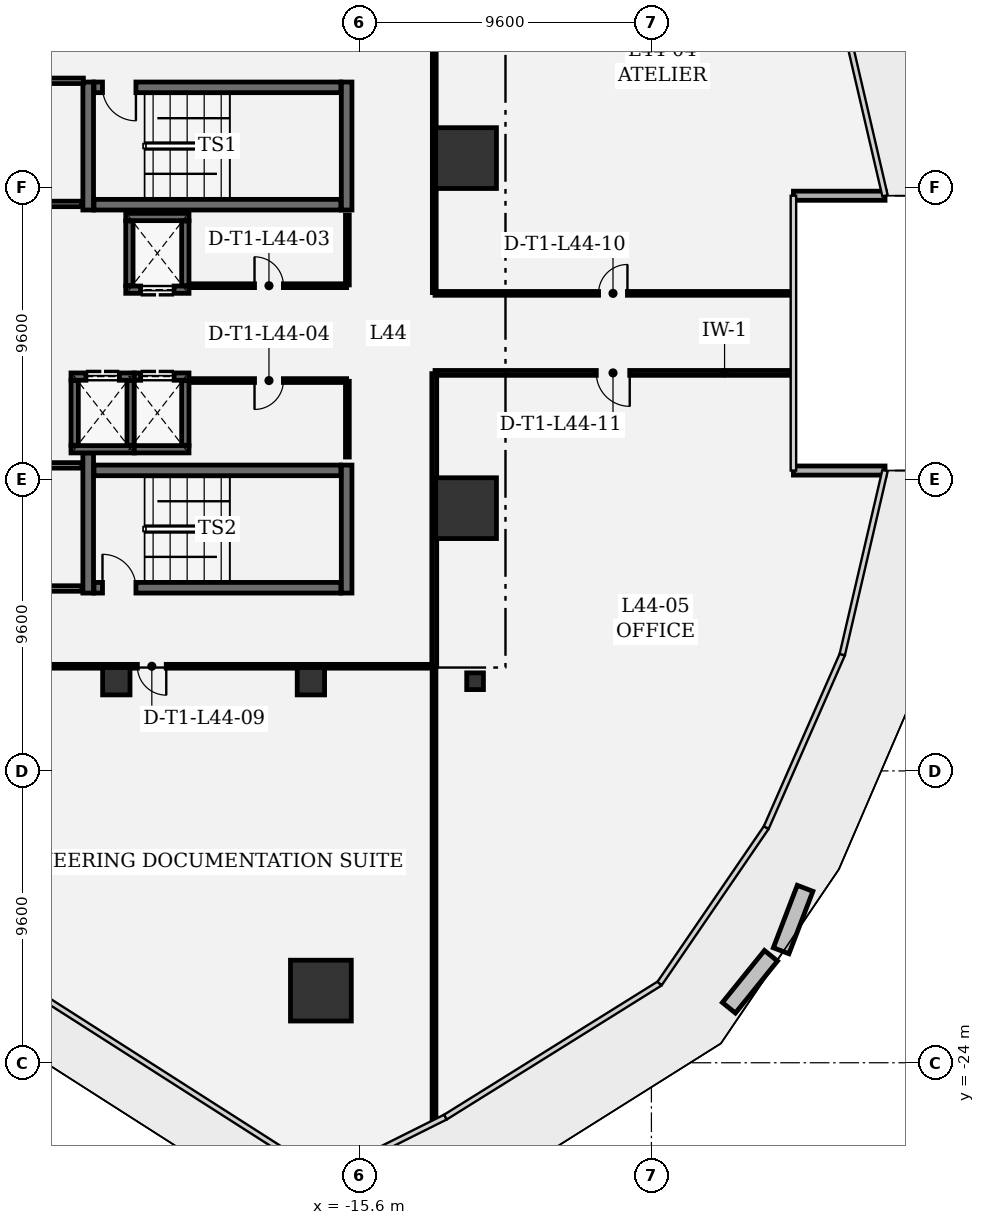
"""IFC4 building model, lengths in metres.
Left out: names, types, materials, properties, quantities, classifications, styles, units other than length and angle.
Written with IfcOpenShell. Run it as: python <this file> out.ifc"""

import sys

from ifc_helpers import new_model, si_unit, direction, frame, frame_2d, origin, origin_2d, place, context, subcontext, project, spatial, rectangle, extrude, element, fill, save


model = new_model("IFC4")
c1 = context("Model", 3, precision=1e-05, world=origin(), true_north=direction((0.0, 1.0)))
c2 = subcontext(c1, "Body", "Model", "MODEL_VIEW")
j1 = project(units=[si_unit("LENGTHUNIT", "METRE"), si_unit("PLANEANGLEUNIT", "RADIAN")], contexts=[c1])
p1 = place(None, origin())
s1 = spatial("IfcSite", under=j1, at=p1, CompositionType="ELEMENT")
p2 = place(p1, origin())
s2 = spatial("IfcBuilding", under=s1, at=p2, CompositionType="ELEMENT")
p3 = place(p2, frame((0.0, 0.0, 192.9)))
s3 = spatial("IfcBuildingStorey", under=s2, at=p3, CompositionType="ELEMENT", Elevation=192.9)
for number, where, z_axis, x_axis in (
    (1, (-16.872, -21.627, 0.0), (0.0, 0.0, 1.0), (1.0, 0.0, 0.0)),
    (2, (-12.097, -5.758, 0.0), (0.0, 0.0, 1.0), (1.0, 0.0, 0.0)),
    (3, (-12.097, 5.758, 0.0), (0.0, 0.0, 1.0), (1.0, 0.0, 0.0)),
):
    element("IfcColumn", number, at=place(p3, frame(where, z_axis=z_axis, x_axis=x_axis)), inside=s3, PredefinedType="COLUMN", context=c2, shape_type="SweptSolid", body=[
        extrude(rectangle(XDim=2.0, YDim=2.0, at=origin_2d()), origin(), (0.0, 0.0, 1.0), 4.05),
    ])
for number, where, z_axis, x_axis in (
    (4, (-17.2, -11.45, 0.0), (0.0, 0.0, 1.0), (1.0, 0.0, 0.0)),
    (5, (-23.6, -11.45, 0.0), (0.0, 0.0, 1.0), (1.0, 0.0, 0.0)),
):
    element("IfcColumn", number, at=place(p3, frame(where, z_axis=z_axis, x_axis=x_axis)), inside=s3, PredefinedType="COLUMN", context=c2, shape_type="SweptSolid", body=[
        extrude(rectangle(XDim=0.9, YDim=0.9, at=origin_2d()), origin(), (0.0, 0.0, 1.0), 4.05),
    ])
p4 = place(p3, frame((-11.8, -11.45, 0.0), z_axis=(0.0, 0.0, 1.0), x_axis=(1.0, 0.0, 0.0)))
e6 = element("IfcColumn", 6, at=p4, inside=s3, PredefinedType="COLUMN", context=c2, shape_type="SweptSolid", body=[
    extrude(rectangle(XDim=0.55, YDim=0.55, at=origin_2d()), origin(), (0.0, 0.0, 1.0), 4.05),
])
for number, where, z_axis, x_axis in (
    (7, (1.684, -4.52, 0.0), (0.0, 0.0, 1.0), (-1.0, 0.0, 0.0)),
    (8, (-1.329, 4.52, 0.0), (0.0, 0.0, 1.0), (1.0, 0.0, 0.0)),
):
    element("IfcWall", number, at=place(p3, frame(where, z_axis=z_axis, x_axis=x_axis)), inside=s3, PredefinedType="SOLIDWALL", context=c2, shape_type="SweptSolid", body=[
        extrude(rectangle(XDim=3.013, YDim=0.3, at=frame_2d((1.507, 0.0))), origin(), (0.0, 0.0, 1.0), 3.78),
    ])
for number, where, z_axis, x_axis in (
    (9, (-24.525, 8.26, 0.0), (0.0, 0.0, 1.0), (0.0, -1.0, 0.0)),
    (10, (-16.025, 4.05, 0.0), (0.0, 0.0, 1.0), (0.0, 1.0, 0.0)),
):
    element("IfcWall", number, at=place(p3, frame(where, z_axis=z_axis, x_axis=x_axis)), inside=s3, PredefinedType="SHEAR", context=c2, shape_type="SweptSolid", body=[
        extrude(rectangle(XDim=4.21, YDim=0.35, at=frame_2d((2.105, 0.0))), origin(), (0.0, 0.0, 1.0), 3.78),
    ])
p5 = place(p3, frame((-24.335, 4.225, 0.0), z_axis=(0.0, 0.0, 1.0), x_axis=(1.0, 0.0, 0.0)))
e11 = element("IfcWall", 11, at=p5, inside=s3, PredefinedType="SHEAR", context=c2, shape_type="SweptSolid", body=[
    extrude(rectangle(XDim=8.12, YDim=0.35, at=frame_2d((4.06, 0.0))), origin(), (0.0, 0.0, 1.0), 3.78),
])
p6 = place(p3, frame((-16.215, 8.085, 0.0), z_axis=(0.0, 0.0, 1.0), x_axis=(-1.0, 0.0, 0.0)))
e12 = element("IfcWall", 12, at=p6, inside=s3, PredefinedType="SHEAR", context=c2, shape_type="SweptSolid", body=[
    extrude(rectangle(XDim=8.12, YDim=0.35, at=frame_2d((4.06, 0.0))), origin(), (0.0, 0.0, 1.0), 3.78),
])
p7 = place(p6, frame((6.74, 0.0, 0.0)))
e13 = element("IfcOpeningElement", 13, at=p7, cuts=e12, PredefinedType="OPENING", context=c2, shape_type="SweptSolid", body=[
    extrude(rectangle(XDim=1.1, YDim=2.2, at=frame_2d((0.55, 1.1))), frame((0.0, 0.185, 0.0), z_axis=(0.0, -1.0, 0.0), x_axis=(1.0, 0.0, 0.0)), (0.0, 0.0, 1.0), 0.37),
])
p8 = place(p3, frame((-24.525, -3.94, 0.0), z_axis=(0.0, 0.0, 1.0), x_axis=(0.0, -1.0, 0.0)))
e14 = element("IfcWall", 14, at=p8, inside=s3, PredefinedType="SHEAR", context=c2, shape_type="SweptSolid", body=[
    extrude(rectangle(XDim=4.61, YDim=0.35, at=frame_2d((2.305, 0.0))), origin(), (0.0, 0.0, 1.0), 3.78),
])
p9 = place(p3, frame((-16.025, -8.55, 0.0), z_axis=(0.0, 0.0, 1.0), x_axis=(0.0, 1.0, 0.0)))
e15 = element("IfcWall", 15, at=p9, inside=s3, PredefinedType="SHEAR", context=c2, shape_type="SweptSolid", body=[
    extrude(rectangle(XDim=4.21, YDim=0.35, at=frame_2d((2.105, 0.0))), origin(), (0.0, 0.0, 1.0), 3.78),
])
p10 = place(p3, frame((-24.335, -8.375, 0.0), z_axis=(0.0, 0.0, 1.0), x_axis=(1.0, 0.0, 0.0)))
e16 = element("IfcWall", 16, at=p10, inside=s3, PredefinedType="SHEAR", context=c2, shape_type="SweptSolid", body=[
    extrude(rectangle(XDim=8.12, YDim=0.35, at=frame_2d((4.06, 0.0))), origin(), (0.0, 0.0, 1.0), 3.78),
])
p11 = place(p10, frame((0.28, 0.0, 0.0)))
e17 = element("IfcOpeningElement", 17, at=p11, cuts=e16, PredefinedType="OPENING", context=c2, shape_type="SweptSolid", body=[
    extrude(rectangle(XDim=1.1, YDim=2.2, at=frame_2d((0.55, 1.1))), frame((0.0, 0.185, 0.0), z_axis=(0.0, -1.0, 0.0), x_axis=(1.0, 0.0, 0.0)), (0.0, 0.0, 1.0), 0.37),
])
p12 = place(p3, frame((-16.215, -4.515, 0.0), z_axis=(0.0, 0.0, 1.0), x_axis=(-1.0, 0.0, 0.0)))
e18 = element("IfcWall", 18, at=p12, inside=s3, PredefinedType="SHEAR", context=c2, shape_type="SweptSolid", body=[
    extrude(rectangle(XDim=8.12, YDim=0.35, at=frame_2d((4.06, 0.0))), origin(), (0.0, 0.0, 1.0), 3.78),
])
p13 = place(p3, frame((-21.21, 1.43, 0.0), z_axis=(0.0, 0.0, 1.0), x_axis=(-1.0, 0.0, 0.0)))
e19 = element("IfcWall", 19, at=p13, inside=s3, PredefinedType="SHEAR", context=c2, shape_type="SweptSolid", body=[
    extrude(rectangle(XDim=2.08, YDim=0.24, at=frame_2d((1.04, 0.0))), origin(), (0.0, 0.0, 1.0), 3.78),
])
p14 = place(p13, frame((0.49, 0.0, 0.0)))
e20 = element("IfcOpeningElement", 20, at=p14, cuts=e19, PredefinedType="OPENING", context=c2, shape_type="SweptSolid", body=[
    extrude(rectangle(XDim=1.1, YDim=2.2, at=frame_2d((0.55, 1.1))), frame((0.0, 0.13, 0.0), z_axis=(0.0, -1.0, 0.0), x_axis=(1.0, 0.0, 0.0)), (0.0, 0.0, 1.0), 0.26),
])
p15 = place(p3, frame((-23.29, 3.82, 0.0), z_axis=(0.0, 0.0, 1.0), x_axis=(1.0, 0.0, 0.0)))
e21 = element("IfcWall", 21, at=p15, inside=s3, PredefinedType="SHEAR", context=c2, shape_type="SweptSolid", body=[
    extrude(rectangle(XDim=2.08, YDim=0.24, at=frame_2d((1.04, 0.0))), origin(), (0.0, 0.0, 1.0), 3.78),
])
for number, where, z_axis, x_axis in (
    (22, (-23.17, 1.562, 0.0), (0.0, 0.0, 1.0), (0.0, 1.0, 0.0)),
    (23, (-21.33, 3.688, 0.0), (0.0, 0.0, 1.0), (0.0, -1.0, 0.0)),
):
    element("IfcWall", number, at=place(p3, frame(where, z_axis=z_axis, x_axis=x_axis)), inside=s3, PredefinedType="SHEAR", context=c2, shape_type="SweptSolid", body=[
        extrude(rectangle(XDim=2.126, YDim=0.24, at=frame_2d((1.063, 0.0))), origin(), (0.0, 0.0, 1.0), 3.78),
    ])
p16 = place(p3, frame((-23.01, -3.82, 0.0), z_axis=(0.0, 0.0, 1.0), x_axis=(-1.0, 0.0, 0.0)))
e24 = element("IfcWall", 24, at=p16, inside=s3, PredefinedType="SHEAR", context=c2, shape_type="SweptSolid", body=[
    extrude(rectangle(XDim=2.08, YDim=0.24, at=frame_2d((1.04, 0.0))), origin(), (0.0, 0.0, 1.0), 3.78),
])
p17 = place(p3, frame((-25.09, -1.43, 0.0), z_axis=(0.0, 0.0, 1.0), x_axis=(1.0, 0.0, 0.0)))
e25 = element("IfcWall", 25, at=p17, inside=s3, PredefinedType="SHEAR", context=c2, shape_type="SweptSolid", body=[
    extrude(rectangle(XDim=2.08, YDim=0.24, at=frame_2d((1.04, 0.0))), origin(), (0.0, 0.0, 1.0), 3.78),
])
p18 = place(p17, frame((0.49, 0.0, 0.0)))
e26 = element("IfcOpeningElement", 26, at=p18, cuts=e25, PredefinedType="OPENING", context=c2, shape_type="SweptSolid", body=[
    extrude(rectangle(XDim=1.1, YDim=2.2, at=frame_2d((0.55, 1.1))), frame((0.0, 0.13, 0.0), z_axis=(0.0, -1.0, 0.0), x_axis=(1.0, 0.0, 0.0)), (0.0, 0.0, 1.0), 0.26),
])
for number, where, z_axis, x_axis in (
    (27, (-24.97, -3.688, 0.0), (0.0, 0.0, 1.0), (0.0, 1.0, 0.0)),
    (28, (-23.13, -1.562, 0.0), (0.0, 0.0, 1.0), (0.0, -1.0, 0.0)),
):
    element("IfcWall", number, at=place(p3, frame(where, z_axis=z_axis, x_axis=x_axis)), inside=s3, PredefinedType="SHEAR", context=c2, shape_type="SweptSolid", body=[
        extrude(rectangle(XDim=2.126, YDim=0.24, at=frame_2d((1.063, 0.0))), origin(), (0.0, 0.0, 1.0), 3.78),
    ])
p19 = place(p3, frame((-21.21, -3.82, 0.0), z_axis=(0.0, 0.0, 1.0), x_axis=(-1.0, 0.0, 0.0)))
e29 = element("IfcWall", 29, at=p19, inside=s3, PredefinedType="SHEAR", context=c2, shape_type="SweptSolid", body=[
    extrude(rectangle(XDim=1.8, YDim=0.24, at=frame_2d((0.9, 0.0))), origin(), (0.0, 0.0, 1.0), 3.78),
])
p20 = place(p3, frame((-23.01, -1.43, 0.0), z_axis=(0.0, 0.0, 1.0), x_axis=(1.0, 0.0, 0.0)))
e30 = element("IfcWall", 30, at=p20, inside=s3, PredefinedType="SHEAR", context=c2, shape_type="SweptSolid", body=[
    extrude(rectangle(XDim=1.8, YDim=0.24, at=frame_2d((0.9, 0.0))), origin(), (0.0, 0.0, 1.0), 3.78),
])
p21 = place(p20, frame((0.21, 0.0, 0.0)))
e31 = element("IfcOpeningElement", 31, at=p21, cuts=e30, PredefinedType="OPENING", context=c2, shape_type="SweptSolid", body=[
    extrude(rectangle(XDim=1.1, YDim=2.2, at=frame_2d((0.55, 1.1))), frame((0.0, 0.13, 0.0), z_axis=(0.0, -1.0, 0.0), x_axis=(1.0, 0.0, 0.0)), (0.0, 0.0, 1.0), 0.26),
])
p22 = place(p3, frame((-21.33, -1.562, 0.0), z_axis=(0.0, 0.0, 1.0), x_axis=(0.0, -1.0, 0.0)))
e32 = element("IfcWall", 32, at=p22, inside=s3, PredefinedType="SHEAR", context=c2, shape_type="SweptSolid", body=[
    extrude(rectangle(XDim=2.126, YDim=0.24, at=frame_2d((1.063, 0.0))), origin(), (0.0, 0.0, 1.0), 3.78),
])
p23 = place(p3, frame((-28.355, 4.25, 0.0), z_axis=(0.0, 0.0, 1.0), x_axis=(1.0, 0.0, 0.0)))
e33 = element("IfcWall", 33, at=p23, inside=s3, PredefinedType="PARTITIONING", context=c2, shape_type="SweptSolid", body=[
    extrude(rectangle(XDim=3.622, YDim=0.18, at=frame_2d((1.811, 0.0))), origin(), (0.0, 0.0, 1.0), 3.78),
])
p24 = place(p3, frame((-24.684, 8.3, 0.0), z_axis=(0.0, 0.0, 1.0), x_axis=(-1.0, 0.0, 0.0)))
e34 = element("IfcWall", 34, at=p24, inside=s3, PredefinedType="PARTITIONING", context=c2, shape_type="SweptSolid", body=[
    extrude(rectangle(XDim=3.671, YDim=0.18, at=frame_2d((1.835, 0.0))), origin(), (0.0, 0.0, 1.0), 3.78),
])
p25 = place(p24, frame((1.335, 0.0, 0.0)))
e35 = element("IfcOpeningElement", 35, at=p25, cuts=e34, PredefinedType="OPENING", context=c2, shape_type="SweptSolid", body=[
    extrude(rectangle(XDim=1.0, YDim=2.15, at=frame_2d((0.5, 1.075))), frame((0.0, 0.1, 0.0), z_axis=(0.0, -1.0, 0.0), x_axis=(1.0, 0.0, 0.0)), (0.0, 0.0, 1.0), 0.2),
])
p26 = place(p3, frame((-28.355, -8.4, 0.0), z_axis=(0.0, 0.0, 1.0), x_axis=(1.0, 0.0, 0.0)))
e36 = element("IfcWall", 36, at=p26, inside=s3, PredefinedType="PARTITIONING", context=c2, shape_type="SweptSolid", body=[
    extrude(rectangle(XDim=3.622, YDim=0.18, at=frame_2d((1.811, 0.0))), origin(), (0.0, 0.0, 1.0), 3.78),
])
p27 = place(p26, frame((1.311, 0.0, 0.0)))
e37 = element("IfcOpeningElement", 37, at=p27, cuts=e36, PredefinedType="OPENING", context=c2, shape_type="SweptSolid", body=[
    extrude(rectangle(XDim=1.0, YDim=2.15, at=frame_2d((0.5, 1.075))), frame((0.0, 0.1, 0.0), z_axis=(0.0, -1.0, 0.0), x_axis=(1.0, 0.0, 0.0)), (0.0, 0.0, 1.0), 0.2),
])
p28 = place(p3, frame((-24.733, -4.35, 0.0), z_axis=(0.0, 0.0, 1.0), x_axis=(-1.0, 0.0, 0.0)))
e38 = element("IfcWall", 38, at=p28, inside=s3, PredefinedType="PARTITIONING", context=c2, shape_type="SweptSolid", body=[
    extrude(rectangle(XDim=3.622, YDim=0.18, at=frame_2d((1.811, 0.0))), origin(), (0.0, 0.0, 1.0), 3.78),
])
p29 = place(p3, frame((-21.134, 1.56, 0.0), z_axis=(0.0, 0.0, 1.0), x_axis=(1.0, 0.0, 0.0)))
e39 = element("IfcWall", 39, at=p29, inside=s3, PredefinedType="PARTITIONING", context=c2, shape_type="SweptSolid", body=[
    extrude(rectangle(XDim=5.109, YDim=0.125, at=frame_2d((2.554, 0.0))), origin(), (0.0, 0.0, 1.0), 3.78),
])
p30 = place(p29, frame((2.079, 0.0, 0.0)))
e40 = element("IfcOpeningElement", 40, at=p30, cuts=e39, PredefinedType="OPENING", context=c2, shape_type="SweptSolid", body=[
    extrude(rectangle(XDim=0.95, YDim=2.15, at=frame_2d((0.475, 1.075))), frame((0.0, 0.073, 0.0), z_axis=(0.0, -1.0, 0.0), x_axis=(1.0, 0.0, 0.0)), (0.0, 0.0, 1.0), 0.145),
])
p31 = place(p3, frame((-16.0, 1.585, 0.0), z_axis=(0.0, 0.0, 1.0), x_axis=(0.0, 1.0, 0.0)))
e41 = element("IfcWall", 41, at=p31, inside=s3, PredefinedType="PARTITIONING", context=c2, shape_type="SweptSolid", body=[
    extrude(rectangle(XDim=2.302, YDim=0.125, at=frame_2d((1.151, 0.0))), origin(), (0.0, 0.0, 1.0), 3.78),
])
p32 = place(p3, frame((-16.0, -4.075, 0.0), z_axis=(0.0, 0.0, 1.0), x_axis=(0.0, 1.0, 0.0)))
e42 = element("IfcWall", 42, at=p32, inside=s3, PredefinedType="PARTITIONING", context=c2, shape_type="SweptSolid", body=[
    extrude(rectangle(XDim=2.49, YDim=0.125, at=frame_2d((1.245, 0.0))), origin(), (0.0, 0.0, 1.0), 3.78),
])
p33 = place(p3, frame((-16.025, -1.56, 0.0), z_axis=(0.0, 0.0, 1.0), x_axis=(-1.0, 0.0, 0.0)))
e43 = element("IfcWall", 43, at=p33, inside=s3, PredefinedType="PARTITIONING", context=c2, shape_type="SweptSolid", body=[
    extrude(rectangle(XDim=5.109, YDim=0.125, at=frame_2d((2.554, 0.0))), origin(), (0.0, 0.0, 1.0), 3.78),
])
p34 = place(p33, frame((2.079, 0.0, 0.0)))
e44 = element("IfcOpeningElement", 44, at=p34, cuts=e43, PredefinedType="OPENING", context=c2, shape_type="SweptSolid", body=[
    extrude(rectangle(XDim=0.95, YDim=2.15, at=frame_2d((0.475, 1.075))), frame((0.0, 0.073, 0.0), z_axis=(0.0, -1.0, 0.0), x_axis=(1.0, 0.0, 0.0)), (0.0, 0.0, 1.0), 0.145),
])
p35 = place(p3, frame((-13.15, -25.895, 0.0), z_axis=(0.0, 0.0, 1.0), x_axis=(0.0, 1.0, 0.0)))
e45 = element("IfcWall", 45, at=p35, inside=s3, PredefinedType="PARTITIONING", context=c2, shape_type="SweptSolid", body=[
    extrude(rectangle(XDim=14.912, YDim=0.125, at=frame_2d((7.456, 0.0))), origin(), (0.0, 0.0, 1.0), 3.78),
])
p36 = place(p3, frame((-13.175, -10.958, 0.0), z_axis=(0.0, 0.0, 1.0), x_axis=(-1.0, 0.0, 0.0)))
e46 = element("IfcWall", 46, at=p36, inside=s3, PredefinedType="PARTITIONING", context=c2, shape_type="SweptSolid", body=[
    extrude(rectangle(XDim=21.442, YDim=0.125, at=frame_2d((10.721, 0.0))), origin(), (0.0, 0.0, 1.0), 2.9),
])
p37 = place(p36, frame((8.782, 0.0, 0.0)))
e47 = element("IfcOpeningElement", 47, at=p37, cuts=e46, PredefinedType="OPENING", context=c2, shape_type="SweptSolid", body=[
    extrude(rectangle(XDim=0.95, YDim=2.15, at=frame_2d((0.475, 1.075))), frame((0.0, 0.073, 0.0), z_axis=(0.0, -1.0, 0.0), x_axis=(1.0, 0.0, 0.0)), (0.0, 0.0, 1.0), 0.145),
])
p38 = place(p3, frame((-13.142, 10.758, 0.0), z_axis=(0.0, 0.0, 1.0), x_axis=(0.0, -1.0, 0.0)))
e48 = element("IfcWall", 48, at=p38, inside=s3, PredefinedType="PARTITIONING", context=c2, shape_type="SweptSolid", body=[
    extrude(rectangle(XDim=9.425, YDim=0.125, at=frame_2d((4.713, 0.0))), origin(), (0.0, 0.0, 1.0), 2.9),
])
p39 = place(p3, frame((-13.117, 1.308, 0.0), z_axis=(0.0, 0.0, 1.0), x_axis=(1.0, 0.0, 0.0)))
e49 = element("IfcWall", 49, at=p39, inside=s3, PredefinedType="PARTITIONING", context=c2, shape_type="SweptSolid", body=[
    extrude(rectangle(XDim=11.708, YDim=0.125, at=frame_2d((5.854, 0.0))), origin(), (0.0, 0.0, 1.0), 3.78),
])
p40 = place(p39, frame((5.379, 0.0, 0.0)))
e50 = element("IfcOpeningElement", 50, at=p40, cuts=e49, PredefinedType="OPENING", context=c2, shape_type="SweptSolid", body=[
    extrude(rectangle(XDim=0.95, YDim=2.15, at=frame_2d((0.475, 1.075))), frame((0.0, 0.073, 0.0), z_axis=(0.0, -1.0, 0.0), x_axis=(1.0, 0.0, 0.0)), (0.0, 0.0, 1.0), 0.145),
])
p41 = place(p3, frame((-1.409, -1.308, 0.0), z_axis=(0.0, 0.0, 1.0), x_axis=(-1.0, 0.0, 0.0)))
e51 = element("IfcWall", 51, at=p41, inside=s3, PredefinedType="PARTITIONING", context=c2, shape_type="SweptSolid", body=[
    extrude(rectangle(XDim=11.708, YDim=0.16, at=frame_2d((5.854, 0.0))), origin(), (0.0, 0.0, 1.0), 3.78),
])
p42 = place(p41, frame((5.304, 0.0, 0.0)))
e52 = element("IfcOpeningElement", 52, at=p42, cuts=e51, PredefinedType="OPENING", context=c2, shape_type="SweptSolid", body=[
    extrude(rectangle(XDim=1.1, YDim=2.15, at=frame_2d((0.55, 1.075))), frame((0.0, 0.09, 0.0), z_axis=(0.0, -1.0, 0.0), x_axis=(1.0, 0.0, 0.0)), (0.0, 0.0, 1.0), 0.18),
])
p43 = place(p3, frame((-13.142, -1.333, 0.0), z_axis=(0.0, 0.0, 1.0), x_axis=(0.0, -1.0, 0.0)))
e53 = element("IfcWall", 53, at=p43, inside=s3, PredefinedType="PARTITIONING", context=c2, shape_type="SweptSolid", body=[
    extrude(rectangle(XDim=9.625, YDim=0.16, at=frame_2d((4.812, 0.0))), origin(), (0.0, 0.0, 1.0), 2.9),
])
p44 = place(p7, origin())
e54 = element("IfcDoor", 54, at=p44, inside=s3, OperationType="SINGLE_SWING_LEFT", PredefinedType="DOOR", context=c2, shape_type="SweptSolid", body=[
    extrude(rectangle(XDim=1.1, YDim=2.2, at=frame_2d((0.55, 1.1))), frame((0.0, 0.025, 0.0), z_axis=(0.0, -1.0, 0.0), x_axis=(1.0, 0.0, 0.0)), (0.0, 0.0, 1.0), 0.05),
])
fill(e13, e54)
p45 = place(p11, origin())
e55 = element("IfcDoor", 55, at=p45, inside=s3, OperationType="SINGLE_SWING_LEFT", PredefinedType="DOOR", context=c2, shape_type="SweptSolid", body=[
    extrude(rectangle(XDim=1.1, YDim=2.2, at=frame_2d((0.55, 1.1))), frame((0.0, 0.025, 0.0), z_axis=(0.0, -1.0, 0.0), x_axis=(1.0, 0.0, 0.0)), (0.0, 0.0, 1.0), 0.05),
])
fill(e17, e55)
p46 = place(p14, origin())
e56 = element("IfcDoor", 56, at=p46, inside=s3, OperationType="DOUBLE_DOOR_SLIDING", PredefinedType="DOOR", context=c2, shape_type="SweptSolid", body=[
    extrude(rectangle(XDim=1.1, YDim=2.2, at=frame_2d((0.55, 1.1))), frame((0.0, 0.025, 0.0), z_axis=(0.0, -1.0, 0.0), x_axis=(1.0, 0.0, 0.0)), (0.0, 0.0, 1.0), 0.05),
])
fill(e20, e56)
p47 = place(p18, origin())
e57 = element("IfcDoor", 57, at=p47, inside=s3, OperationType="DOUBLE_DOOR_SLIDING", PredefinedType="DOOR", context=c2, shape_type="SweptSolid", body=[
    extrude(rectangle(XDim=1.1, YDim=2.2, at=frame_2d((0.55, 1.1))), frame((0.0, 0.025, 0.0), z_axis=(0.0, -1.0, 0.0), x_axis=(1.0, 0.0, 0.0)), (0.0, 0.0, 1.0), 0.05),
])
fill(e26, e57)
p48 = place(p21, origin())
e58 = element("IfcDoor", 58, at=p48, inside=s3, OperationType="DOUBLE_DOOR_SLIDING", PredefinedType="DOOR", context=c2, shape_type="SweptSolid", body=[
    extrude(rectangle(XDim=1.1, YDim=2.2, at=frame_2d((0.55, 1.1))), frame((0.0, 0.025, 0.0), z_axis=(0.0, -1.0, 0.0), x_axis=(1.0, 0.0, 0.0)), (0.0, 0.0, 1.0), 0.05),
])
fill(e31, e58)
p49 = place(p30, origin())
e59 = element("IfcDoor", 59, at=p49, inside=s3, OperationType="SINGLE_SWING_LEFT", PredefinedType="DOOR", context=c2, shape_type="SweptSolid", body=[
    extrude(rectangle(XDim=0.95, YDim=2.15, at=frame_2d((0.475, 1.075))), frame((0.0, 0.025, 0.0), z_axis=(0.0, -1.0, 0.0), x_axis=(1.0, 0.0, 0.0)), (0.0, 0.0, 1.0), 0.05),
])
fill(e40, e59)
p50 = place(p34, origin())
e60 = element("IfcDoor", 60, at=p50, inside=s3, OperationType="SINGLE_SWING_RIGHT", PredefinedType="DOOR", context=c2, shape_type="SweptSolid", body=[
    extrude(rectangle(XDim=0.95, YDim=2.15, at=frame_2d((0.475, 1.075))), frame((0.0, 0.025, 0.0), z_axis=(0.0, -1.0, 0.0), x_axis=(1.0, 0.0, 0.0)), (0.0, 0.0, 1.0), 0.05),
])
fill(e44, e60)
p51 = place(p37, origin())
e61 = element("IfcDoor", 61, at=p51, inside=s3, OperationType="SINGLE_SWING_LEFT", PredefinedType="DOOR", context=c2, shape_type="SweptSolid", body=[
    extrude(rectangle(XDim=0.95, YDim=2.15, at=frame_2d((0.475, 1.075))), frame((0.0, 0.025, 0.0), z_axis=(0.0, -1.0, 0.0), x_axis=(1.0, 0.0, 0.0)), (0.0, 0.0, 1.0), 0.05),
])
fill(e47, e61)
p52 = place(p40, origin())
e62 = element("IfcDoor", 62, at=p52, inside=s3, OperationType="SINGLE_SWING_RIGHT", PredefinedType="DOOR", context=c2, shape_type="SweptSolid", body=[
    extrude(rectangle(XDim=0.95, YDim=2.15, at=frame_2d((0.475, 1.075))), frame((0.0, 0.025, 0.0), z_axis=(0.0, -1.0, 0.0), x_axis=(1.0, 0.0, 0.0)), (0.0, 0.0, 1.0), 0.05),
])
fill(e50, e62)
p53 = place(p42, origin())
e63 = element("IfcDoor", 63, at=p53, inside=s3, OperationType="SINGLE_SWING_LEFT", PredefinedType="DOOR", context=c2, shape_type="SweptSolid", body=[
    extrude(rectangle(XDim=1.1, YDim=2.15, at=frame_2d((0.55, 1.075))), frame((0.0, 0.025, 0.0), z_axis=(0.0, -1.0, 0.0), x_axis=(1.0, 0.0, 0.0)), (0.0, 0.0, 1.0), 0.05),
])
fill(e52, e63)
save(model, sys.argv[1])
